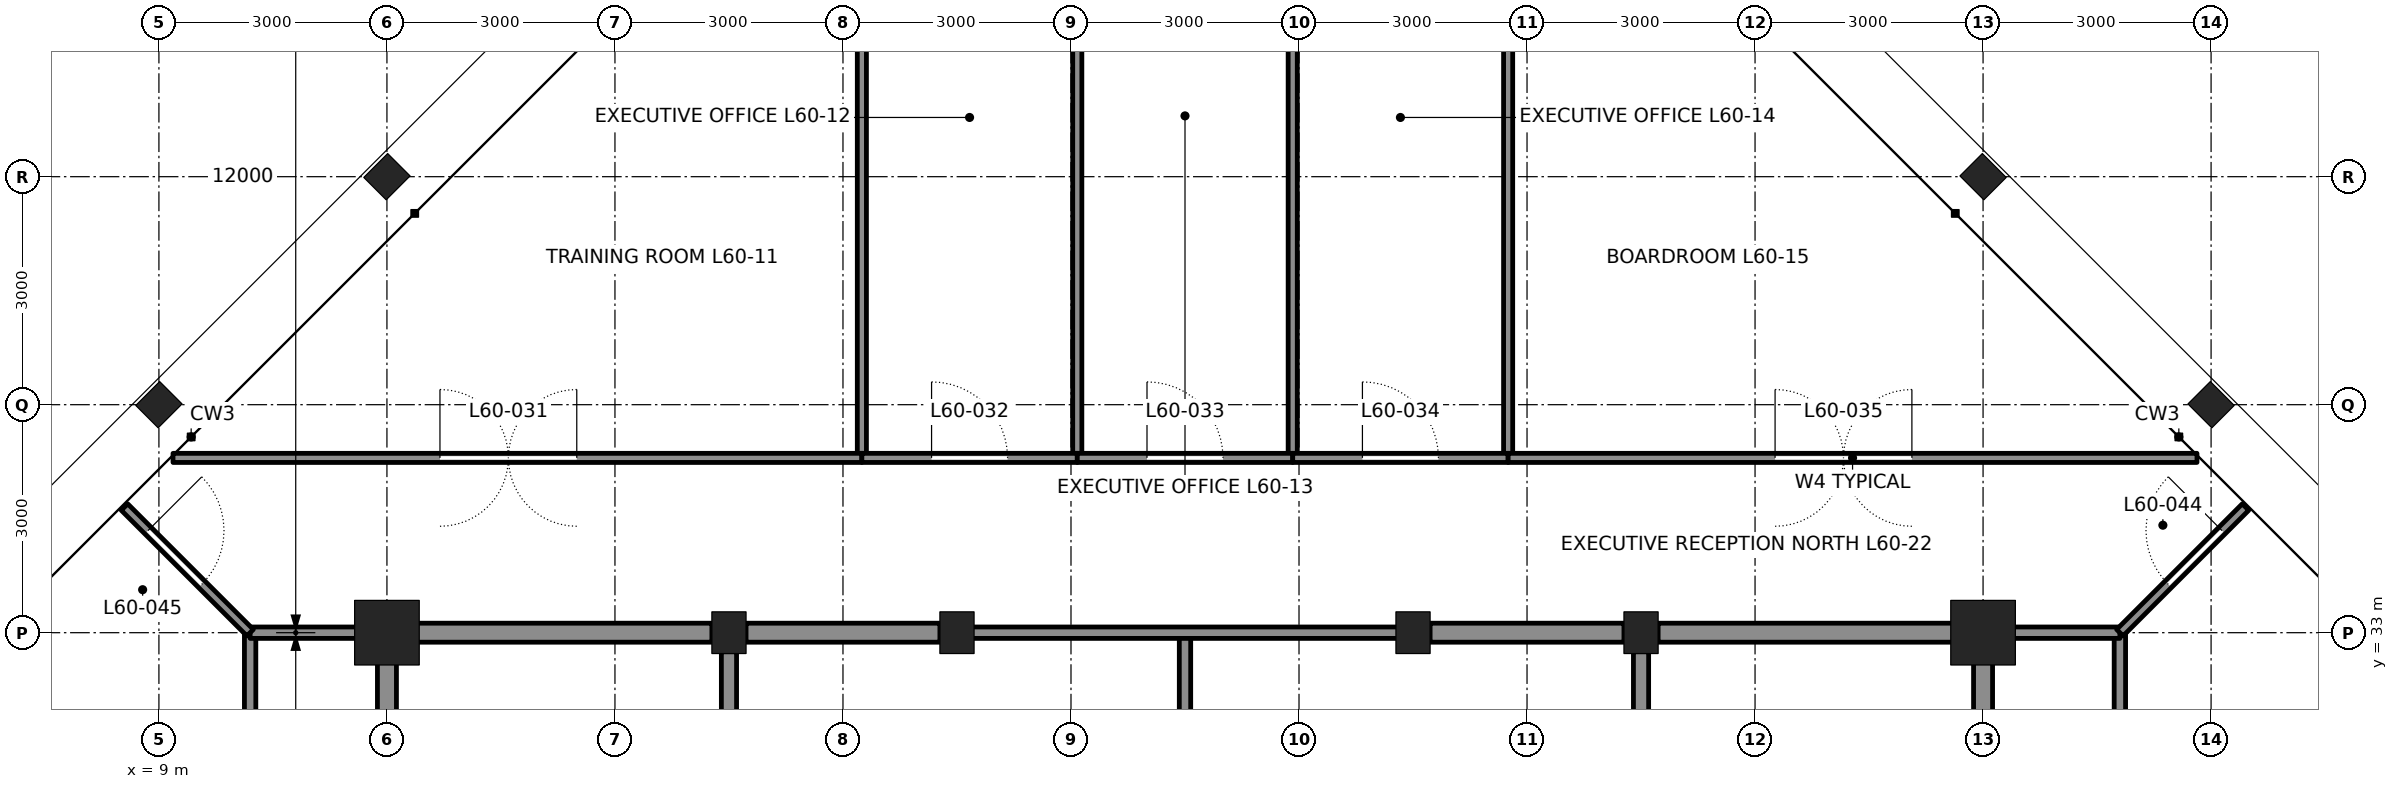
"""IFC4 building model, lengths in metres.
Left out: names, types, materials, properties, quantities, classifications, styles, units other than length and angle.
Written with IfcOpenShell. Run it as: python <this file> out.ifc"""

import sys

from ifc_helpers import new_model, si_unit, direction, frame, frame_2d, origin, origin_2d, place, context, subcontext, project, spatial, rectangle, hollow_rectangle, i_section, extrude, element, fill, save


model = new_model("IFC4")
c1 = context("Model", 3, precision=1e-05, world=origin(), true_north=direction((0.0, 1.0)))
c2 = subcontext(c1, "Body", "Model", "MODEL_VIEW")
j1 = project(units=[si_unit("LENGTHUNIT", "METRE"), si_unit("PLANEANGLEUNIT", "RADIAN")], contexts=[c1])
p1 = place(None, origin())
s1 = spatial("IfcSite", under=j1, at=p1, CompositionType="ELEMENT")
p2 = place(p1, origin())
s2 = spatial("IfcBuilding", under=s1, at=p2, CompositionType="ELEMENT")
p3 = place(p2, frame((0.0, 0.0, 270.6)))
s3 = spatial("IfcBuildingStorey", under=s2, at=p3, CompositionType="ELEMENT", Elevation=270.6)
for number, where, z_axis, x_axis in (
    (1, (36.0, 36.0, 0.0), (0.0, 0.0, 1.0), (0.707, 0.707, 0.0)),
    (2, (33.0, 39.0, 0.0), (0.0, 0.0, 1.0), (0.707, 0.707, 0.0)),
    (3, (12.0, 39.0, 0.0), (0.0, 0.0, 1.0), (-0.707, 0.707, 0.0)),
    (4, (9.0, 36.0, 0.0), (0.0, 0.0, 1.0), (-0.707, 0.707, 0.0)),
):
    element("IfcColumn", number, at=place(p3, frame(where, z_axis=z_axis, x_axis=x_axis)), inside=s3, PredefinedType="COLUMN", context=c2, shape_type="SweptSolid", body=[
        extrude(i_section(OverallWidth=0.417, OverallDepth=0.445, WebThickness=0.039, FlangeThickness=0.063, at=origin_2d()), origin(), (0.0, 0.0, 1.0), 4.2),
    ])
p4 = place(p3, frame((12.0, 33.0, 0.0), z_axis=(0.0, 0.0, 1.0), x_axis=(1.0, 0.0, 0.0)))
e5 = element("IfcColumn", 5, at=p4, inside=s3, PredefinedType="COLUMN", context=c2, shape_type="SweptSolid", body=[
    extrude(hollow_rectangle(XDim=0.85, YDim=0.85, WallThickness=0.085, at=origin_2d()), origin(), (0.0, 0.0, 1.0), 4.2),
])
for number, where, z_axis, x_axis in (
    (6, (16.5, 33.0, 0.0), (0.0, 0.0, 1.0), (1.0, 0.0, 0.0)),
    (7, (19.5, 33.0, 0.0), (0.0, 0.0, 1.0), (1.0, 0.0, 0.0)),
    (8, (25.5, 33.0, 0.0), (0.0, 0.0, 1.0), (1.0, 0.0, 0.0)),
    (9, (28.5, 33.0, 0.0), (0.0, 0.0, 1.0), (1.0, 0.0, 0.0)),
):
    element("IfcColumn", number, at=place(p3, frame(where, z_axis=z_axis, x_axis=x_axis)), inside=s3, PredefinedType="COLUMN", context=c2, shape_type="SweptSolid", body=[
        extrude(i_section(OverallWidth=0.449, OverallDepth=0.549, WebThickness=0.072, FlangeThickness=0.115, at=origin_2d()), origin(), (0.0, 0.0, 1.0), 4.2),
    ])
p5 = place(p3, frame((33.0, 33.0, 0.0), z_axis=(0.0, 0.0, 1.0), x_axis=(1.0, 0.0, 0.0)))
e10 = element("IfcColumn", 10, at=p5, inside=s3, PredefinedType="COLUMN", context=c2, shape_type="SweptSolid", body=[
    extrude(hollow_rectangle(XDim=0.85, YDim=0.85, WallThickness=0.085, at=origin_2d()), origin(), (0.0, 0.0, 1.0), 4.2),
])
p6 = place(p3, frame((12.0, 24.25, 0.0), z_axis=(0.0, 0.0, 1.0), x_axis=(0.0, 1.0, 0.0)))
e11 = element("IfcWall", 11, at=p6, inside=s3, PredefinedType="SOLIDWALL", context=c2, shape_type="SweptSolid", body=[
    extrude(rectangle(XDim=8.5, YDim=0.25, at=frame_2d((4.25, 0.0))), origin(), (0.0, 0.0, 1.0), 3.113),
])
p7 = place(p6, frame((0.65, 0.0, 0.0)))
e12 = element("IfcOpeningElement", 12, at=p7, cuts=e11, PredefinedType="OPENING", context=c2, shape_type="SweptSolid", body=[
    extrude(rectangle(XDim=1.2, YDim=2.1, at=frame_2d((0.6, 1.05))), frame((0.0, 0.135, 0.0), z_axis=(0.0, -1.0, 0.0), x_axis=(1.0, 0.0, 0.0)), (0.0, 0.0, 1.0), 0.27),
])
p8 = place(p6, frame((6.875, 0.0, 0.0)))
e13 = element("IfcOpeningElement", 13, at=p8, cuts=e11, PredefinedType="OPENING", context=c2, shape_type="SweptSolid", body=[
    extrude(rectangle(XDim=0.75, YDim=2.1, at=frame_2d((0.375, 1.05))), frame((0.0, 0.135, 0.0), z_axis=(0.0, -1.0, 0.0), x_axis=(1.0, 0.0, 0.0)), (0.0, 0.0, 1.0), 0.27),
])
p9 = place(p3, frame((12.25, 33.0, 0.0), z_axis=(0.0, 0.0, 1.0), x_axis=(1.0, 0.0, 0.0)))
e14 = element("IfcWall", 14, at=p9, inside=s3, PredefinedType="SOLIDWALL", context=c2, shape_type="SweptSolid", body=[
    extrude(rectangle(XDim=4.025, YDim=0.25, at=frame_2d((2.013, 0.0))), origin(), (0.0, 0.0, 1.0), 3.181),
])
for number, where, z_axis, x_axis in (
    (15, (16.725, 33.0, 0.0), (0.0, 0.0, 1.0), (1.0, 0.0, 0.0)),
    (16, (25.725, 33.0, 0.0), (0.0, 0.0, 1.0), (1.0, 0.0, 0.0)),
):
    element("IfcWall", number, at=place(p3, frame(where, z_axis=z_axis, x_axis=x_axis)), inside=s3, PredefinedType="SOLIDWALL", context=c2, shape_type="SweptSolid", body=[
        extrude(rectangle(XDim=2.55, YDim=0.25, at=frame_2d((1.275, 0.0))), origin(), (0.0, 0.0, 1.0), 3.181),
    ])
p10 = place(p3, frame((28.725, 33.0, 0.0), z_axis=(0.0, 0.0, 1.0), x_axis=(1.0, 0.0, 0.0)))
e17 = element("IfcWall", 17, at=p10, inside=s3, PredefinedType="SOLIDWALL", context=c2, shape_type="SweptSolid", body=[
    extrude(rectangle(XDim=4.025, YDim=0.25, at=frame_2d((2.013, 0.0))), origin(), (0.0, 0.0, 1.0), 3.181),
])
for number, where, z_axis, x_axis in (
    (18, (16.5, 24.25, 0.0), (0.0, 0.0, 1.0), (0.0, 1.0, 0.0)),
    (19, (28.5, 24.25, 0.0), (0.0, 0.0, 1.0), (0.0, 1.0, 0.0)),
):
    element("IfcWall", number, at=place(p3, frame(where, z_axis=z_axis, x_axis=x_axis)), inside=s3, PredefinedType="SOLIDWALL", context=c2, shape_type="SweptSolid", body=[
        extrude(rectangle(XDim=8.5, YDim=0.2, at=frame_2d((4.25, 0.0))), origin(), (0.0, 0.0, 1.0), 3.113),
    ])
p11 = place(p3, frame((33.0, 24.25, 0.0), z_axis=(0.0, 0.0, 1.0), x_axis=(0.0, 1.0, 0.0)))
e20 = element("IfcWall", 20, at=p11, inside=s3, PredefinedType="SOLIDWALL", context=c2, shape_type="SweptSolid", body=[
    extrude(rectangle(XDim=8.5, YDim=0.25, at=frame_2d((4.25, 0.0))), origin(), (0.0, 0.0, 1.0), 3.113),
])
p12 = place(p11, frame((6.875, 0.0, 0.0)))
e21 = element("IfcOpeningElement", 21, at=p12, cuts=e20, PredefinedType="OPENING", context=c2, shape_type="SweptSolid", body=[
    extrude(rectangle(XDim=0.75, YDim=2.1, at=frame_2d((0.375, 1.05))), frame((0.0, 0.135, 0.0), z_axis=(0.0, -1.0, 0.0), x_axis=(1.0, 0.0, 0.0)), (0.0, 0.0, 1.0), 0.27),
])
p13 = place(p3, frame((22.5, 27.0, 0.0), z_axis=(0.0, 0.0, 1.0), x_axis=(0.0, 1.0, 0.0)))
e22 = element("IfcWall", 22, at=p13, inside=s3, PredefinedType="PARTITIONING", context=c2, shape_type="SweptSolid", body=[
    extrude(rectangle(XDim=6.0, YDim=0.15, at=frame_2d((3.0, 0.0))), origin(), (0.0, 0.0, 1.0), 4.04),
])
p14 = place(p3, frame((19.5, 33.0, 0.0), z_axis=(0.0, 0.0, 1.0), x_axis=(1.0, 0.0, 0.0)))
e23 = element("IfcWall", 23, at=p14, inside=s3, PredefinedType="PARTITIONING", context=c2, shape_type="SweptSolid", body=[
    extrude(rectangle(XDim=6.0, YDim=0.15, at=frame_2d((3.0, 0.0))), origin(), (0.0, 0.0, 1.0), 3.181),
])
p15 = place(p3, frame((18.249, 44.334, 0.0), z_axis=(0.0, 0.0, 1.0), x_axis=(0.0, -1.0, 0.0)))
e24 = element("IfcWall", 24, at=p15, inside=s3, PredefinedType="PARTITIONING", context=c2, shape_type="SweptSolid", body=[
    extrude(rectangle(XDim=9.034, YDim=0.12, at=frame_2d((4.517, 0.0))), origin(), (0.0, 0.0, 1.0), 4.04),
])
for number, where, z_axis, x_axis in (
    (25, (21.083, 44.347, 0.0), (0.0, 0.0, 1.0), (0.0, -1.0, 0.0)),
    (26, (23.917, 44.347, 0.0), (0.0, 0.0, 1.0), (0.0, -1.0, 0.0)),
):
    element("IfcWall", number, at=place(p3, frame(where, z_axis=z_axis, x_axis=x_axis)), inside=s3, PredefinedType="PARTITIONING", context=c2, shape_type="SweptSolid", body=[
        extrude(rectangle(XDim=9.047, YDim=0.12, at=frame_2d((4.524, 0.0))), origin(), (0.0, 0.0, 1.0), 3.357),
    ])
p16 = place(p3, frame((26.751, 44.334, 0.0), z_axis=(0.0, 0.0, 1.0), x_axis=(0.0, -1.0, 0.0)))
e27 = element("IfcWall", 27, at=p16, inside=s3, PredefinedType="PARTITIONING", context=c2, shape_type="SweptSolid", body=[
    extrude(rectangle(XDim=9.034, YDim=0.12, at=frame_2d((4.517, 0.0))), origin(), (0.0, 0.0, 1.0), 4.04),
])
p17 = place(p3, frame((9.186, 35.3, 0.0), z_axis=(0.0, 0.0, 1.0), x_axis=(1.0, 0.0, 0.0)))
e28 = element("IfcWall", 28, at=p17, inside=s3, PredefinedType="PARTITIONING", context=c2, shape_type="SweptSolid", body=[
    extrude(rectangle(XDim=9.063, YDim=0.12, at=frame_2d((4.531, 0.0))), origin(), (0.0, 0.0, 1.0), 4.04),
])
p18 = place(p17, frame((3.512, 0.0, 0.0)))
e29 = element("IfcOpeningElement", 29, at=p18, cuts=e28, PredefinedType="OPENING", context=c2, shape_type="SweptSolid", body=[
    extrude(rectangle(XDim=1.8, YDim=2.4, at=frame_2d((0.9, 1.2))), frame((0.0, 0.07, 0.0), z_axis=(0.0, -1.0, 0.0), x_axis=(1.0, 0.0, 0.0)), (0.0, 0.0, 1.0), 0.14),
])
p19 = place(p3, frame((18.249, 35.3, 0.0), z_axis=(0.0, 0.0, 1.0), x_axis=(1.0, 0.0, 0.0)))
e30 = element("IfcWall", 30, at=p19, inside=s3, PredefinedType="PARTITIONING", context=c2, shape_type="SweptSolid", body=[
    extrude(rectangle(XDim=2.834, YDim=0.12, at=frame_2d((1.417, 0.0))), origin(), (0.0, 0.0, 1.0), 4.04),
])
p20 = place(p19, frame((0.917, 0.0, 0.0)))
e31 = element("IfcOpeningElement", 31, at=p20, cuts=e30, PredefinedType="OPENING", context=c2, shape_type="SweptSolid", body=[
    extrude(rectangle(XDim=1.0, YDim=2.4, at=frame_2d((0.5, 1.2))), frame((0.0, 0.07, 0.0), z_axis=(0.0, -1.0, 0.0), x_axis=(1.0, 0.0, 0.0)), (0.0, 0.0, 1.0), 0.14),
])
p21 = place(p3, frame((21.083, 35.3, 0.0), z_axis=(0.0, 0.0, 1.0), x_axis=(1.0, 0.0, 0.0)))
e32 = element("IfcWall", 32, at=p21, inside=s3, PredefinedType="PARTITIONING", context=c2, shape_type="SweptSolid", body=[
    extrude(rectangle(XDim=2.834, YDim=0.12, at=frame_2d((1.417, 0.0))), origin(), (0.0, 0.0, 1.0), 4.04),
])
p22 = place(p21, frame((0.917, 0.0, 0.0)))
e33 = element("IfcOpeningElement", 33, at=p22, cuts=e32, PredefinedType="OPENING", context=c2, shape_type="SweptSolid", body=[
    extrude(rectangle(XDim=1.0, YDim=2.4, at=frame_2d((0.5, 1.2))), frame((0.0, 0.07, 0.0), z_axis=(0.0, -1.0, 0.0), x_axis=(1.0, 0.0, 0.0)), (0.0, 0.0, 1.0), 0.14),
])
p23 = place(p3, frame((23.917, 35.3, 0.0), z_axis=(0.0, 0.0, 1.0), x_axis=(1.0, 0.0, 0.0)))
e34 = element("IfcWall", 34, at=p23, inside=s3, PredefinedType="PARTITIONING", context=c2, shape_type="SweptSolid", body=[
    extrude(rectangle(XDim=2.834, YDim=0.12, at=frame_2d((1.417, 0.0))), origin(), (0.0, 0.0, 1.0), 4.04),
])
p24 = place(p23, frame((0.917, 0.0, 0.0)))
e35 = element("IfcOpeningElement", 35, at=p24, cuts=e34, PredefinedType="OPENING", context=c2, shape_type="SweptSolid", body=[
    extrude(rectangle(XDim=1.0, YDim=2.4, at=frame_2d((0.5, 1.2))), frame((0.0, 0.07, 0.0), z_axis=(0.0, -1.0, 0.0), x_axis=(1.0, 0.0, 0.0)), (0.0, 0.0, 1.0), 0.14),
])
p25 = place(p3, frame((26.751, 35.3, 0.0), z_axis=(0.0, 0.0, 1.0), x_axis=(1.0, 0.0, 0.0)))
e36 = element("IfcWall", 36, at=p25, inside=s3, PredefinedType="PARTITIONING", context=c2, shape_type="SweptSolid", body=[
    extrude(rectangle(XDim=9.063, YDim=0.12, at=frame_2d((4.531, 0.0))), origin(), (0.0, 0.0, 1.0), 4.04),
])
p26 = place(p25, frame((3.512, 0.0, 0.0)))
e37 = element("IfcOpeningElement", 37, at=p26, cuts=e36, PredefinedType="OPENING", context=c2, shape_type="SweptSolid", body=[
    extrude(rectangle(XDim=1.8, YDim=2.4, at=frame_2d((0.9, 1.2))), frame((0.0, 0.07, 0.0), z_axis=(0.0, -1.0, 0.0), x_axis=(1.0, 0.0, 0.0)), (0.0, 0.0, 1.0), 0.14),
])
p27 = place(p3, frame((10.2, 8.686, 0.0), z_axis=(0.0, 0.0, 1.0), x_axis=(0.0, 1.0, 0.0)))
e38 = element("IfcWall", 38, at=p27, inside=s3, PredefinedType="PARTITIONING", context=c2, shape_type="SweptSolid", body=[
    extrude(rectangle(XDim=24.314, YDim=0.15, at=frame_2d((12.157, 0.0))), origin(), (0.0, 0.0, 1.0), 4.04),
])
p28 = place(p27, frame((11.5, 0.0, 0.0)))
e39 = element("IfcOpeningElement", 39, at=p28, cuts=e38, PredefinedType="OPENING", context=c2, shape_type="SweptSolid", body=[
    extrude(rectangle(XDim=1.0, YDim=2.4, at=frame_2d((0.5, 1.2))), frame((0.0, 0.085, 0.0), z_axis=(0.0, -1.0, 0.0), x_axis=(1.0, 0.0, 0.0)), (0.0, 0.0, 1.0), 0.17),
])
p29 = place(p3, frame((10.2, 33.0, 0.0), z_axis=(0.0, 0.0, 1.0), x_axis=(1.0, 0.0, 0.0)))
e40 = element("IfcWall", 40, at=p29, inside=s3, PredefinedType="PARTITIONING", context=c2, shape_type="SweptSolid", body=[
    extrude(rectangle(XDim=1.8, YDim=0.15, at=frame_2d((0.9, 0.0))), origin(), (0.0, 0.0, 1.0), 3.27),
])
p30 = place(p3, frame((34.8, 8.686, 0.0), z_axis=(0.0, 0.0, 1.0), x_axis=(0.0, 1.0, 0.0)))
e41 = element("IfcWall", 41, at=p30, inside=s3, PredefinedType="PARTITIONING", context=c2, shape_type="SweptSolid", body=[
    extrude(rectangle(XDim=24.314, YDim=0.15, at=frame_2d((12.157, 0.0))), origin(), (0.0, 0.0, 1.0), 4.04),
])
p31 = place(p30, frame((11.5, 0.0, 0.0)))
e42 = element("IfcOpeningElement", 42, at=p31, cuts=e41, PredefinedType="OPENING", context=c2, shape_type="SweptSolid", body=[
    extrude(rectangle(XDim=1.0, YDim=2.4, at=frame_2d((0.5, 1.2))), frame((0.0, 0.085, 0.0), z_axis=(0.0, -1.0, 0.0), x_axis=(1.0, 0.0, 0.0)), (0.0, 0.0, 1.0), 0.17),
])
p32 = place(p3, frame((33.0, 33.0, 0.0), z_axis=(0.0, 0.0, 1.0), x_axis=(1.0, 0.0, 0.0)))
e43 = element("IfcWall", 43, at=p32, inside=s3, PredefinedType="PARTITIONING", context=c2, shape_type="SweptSolid", body=[
    extrude(rectangle(XDim=1.8, YDim=0.15, at=frame_2d((0.9, 0.0))), origin(), (0.0, 0.0, 1.0), 3.27),
])
p33 = place(p3, frame((34.8, 33.0, 0.0), z_axis=(0.0, 0.0, 1.0), x_axis=(0.707106781187, 0.707106781187, 0.0)))
e44 = element("IfcWall", 44, at=p33, inside=s3, PredefinedType="PARTITIONING", context=c2, shape_type="SweptSolid", body=[
    extrude(rectangle(XDim=2.338, YDim=0.12, at=frame_2d((1.169, 0.0))), origin(), (0.0, 0.0, 1.0), 4.04),
])
p34 = place(p33, frame((0.9, 0.0, 0.0)))
e45 = element("IfcOpeningElement", 45, at=p34, cuts=e44, PredefinedType="OPENING", context=c2, shape_type="SweptSolid", body=[
    extrude(rectangle(XDim=1.0, YDim=2.4, at=frame_2d((0.5, 1.2))), frame((0.0, 0.07, 0.0), z_axis=(0.0, -1.0, 0.0), x_axis=(1.0, 0.0, 0.0)), (0.0, 0.0, 1.0), 0.14),
])
p35 = place(p3, frame((10.2, 33.0, 0.0), z_axis=(0.0, 0.0, 1.0), x_axis=(-0.707106781187, 0.707106781187, 0.0)))
e46 = element("IfcWall", 46, at=p35, inside=s3, PredefinedType="PARTITIONING", context=c2, shape_type="SweptSolid", body=[
    extrude(rectangle(XDim=2.338, YDim=0.12, at=frame_2d((1.169, 0.0))), origin(), (0.0, 0.0, 1.0), 4.04),
])
p36 = place(p35, frame((0.9, 0.0, 0.0)))
e47 = element("IfcOpeningElement", 47, at=p36, cuts=e46, PredefinedType="OPENING", context=c2, shape_type="SweptSolid", body=[
    extrude(rectangle(XDim=1.0, YDim=2.4, at=frame_2d((0.5, 1.2))), frame((0.0, 0.07, 0.0), z_axis=(0.0, -1.0, 0.0), x_axis=(1.0, 0.0, 0.0)), (0.0, 0.0, 1.0), 0.14),
])
p37 = place(p18, origin())
e48 = element("IfcDoor", 48, at=p37, inside=s3, OperationType="DOUBLE_DOOR_DOUBLE_SWING", PredefinedType="DOOR", context=c2, shape_type="SweptSolid", body=[
    extrude(rectangle(XDim=1.8, YDim=2.4, at=frame_2d((0.9, 1.2))), frame((0.0, 0.025, 0.0), z_axis=(0.0, -1.0, 0.0), x_axis=(1.0, 0.0, 0.0)), (0.0, 0.0, 1.0), 0.05),
])
fill(e29, e48)
p38 = place(p20, origin())
e49 = element("IfcDoor", 49, at=p38, inside=s3, OperationType="SINGLE_SWING_LEFT", PredefinedType="DOOR", context=c2, shape_type="SweptSolid", body=[
    extrude(rectangle(XDim=1.0, YDim=2.4, at=frame_2d((0.5, 1.2))), frame((0.0, 0.025, 0.0), z_axis=(0.0, -1.0, 0.0), x_axis=(1.0, 0.0, 0.0)), (0.0, 0.0, 1.0), 0.05),
])
fill(e31, e49)
p39 = place(p22, origin())
e50 = element("IfcDoor", 50, at=p39, inside=s3, OperationType="SINGLE_SWING_LEFT", PredefinedType="DOOR", context=c2, shape_type="SweptSolid", body=[
    extrude(rectangle(XDim=1.0, YDim=2.4, at=frame_2d((0.5, 1.2))), frame((0.0, 0.025, 0.0), z_axis=(0.0, -1.0, 0.0), x_axis=(1.0, 0.0, 0.0)), (0.0, 0.0, 1.0), 0.05),
])
fill(e33, e50)
p40 = place(p24, origin())
e51 = element("IfcDoor", 51, at=p40, inside=s3, OperationType="SINGLE_SWING_LEFT", PredefinedType="DOOR", context=c2, shape_type="SweptSolid", body=[
    extrude(rectangle(XDim=1.0, YDim=2.4, at=frame_2d((0.5, 1.2))), frame((0.0, 0.025, 0.0), z_axis=(0.0, -1.0, 0.0), x_axis=(1.0, 0.0, 0.0)), (0.0, 0.0, 1.0), 0.05),
])
fill(e35, e51)
p41 = place(p26, origin())
e52 = element("IfcDoor", 52, at=p41, inside=s3, OperationType="DOUBLE_DOOR_DOUBLE_SWING", PredefinedType="DOOR", context=c2, shape_type="SweptSolid", body=[
    extrude(rectangle(XDim=1.8, YDim=2.4, at=frame_2d((0.9, 1.2))), frame((0.0, 0.025, 0.0), z_axis=(0.0, -1.0, 0.0), x_axis=(1.0, 0.0, 0.0)), (0.0, 0.0, 1.0), 0.05),
])
fill(e37, e52)
p42 = place(p34, origin())
e53 = element("IfcDoor", 53, at=p42, inside=s3, OperationType="SINGLE_SWING_RIGHT", PredefinedType="DOOR", context=c2, shape_type="SweptSolid", body=[
    extrude(rectangle(XDim=1.0, YDim=2.4, at=frame_2d((0.5, 1.2))), frame((0.0, 0.025, 0.0), z_axis=(0.0, -1.0, 0.0), x_axis=(1.0, 0.0, 0.0)), (0.0, 0.0, 1.0), 0.05),
])
fill(e45, e53)
p43 = place(p36, frame((1.0, 0.0, 0.0), z_axis=(0.0, 0.0, 1.0), x_axis=(-1.0, 0.0, 0.0)))
e54 = element("IfcDoor", 54, at=p43, inside=s3, OperationType="SINGLE_SWING_LEFT", PredefinedType="DOOR", context=c2, shape_type="SweptSolid", body=[
    extrude(rectangle(XDim=1.0, YDim=2.4, at=frame_2d((0.5, 1.2))), frame((0.0, 0.025, 0.0), z_axis=(0.0, -1.0, 0.0), x_axis=(1.0, 0.0, 0.0)), (0.0, 0.0, 1.0), 0.05),
])
fill(e47, e54)
save(model, sys.argv[1])
